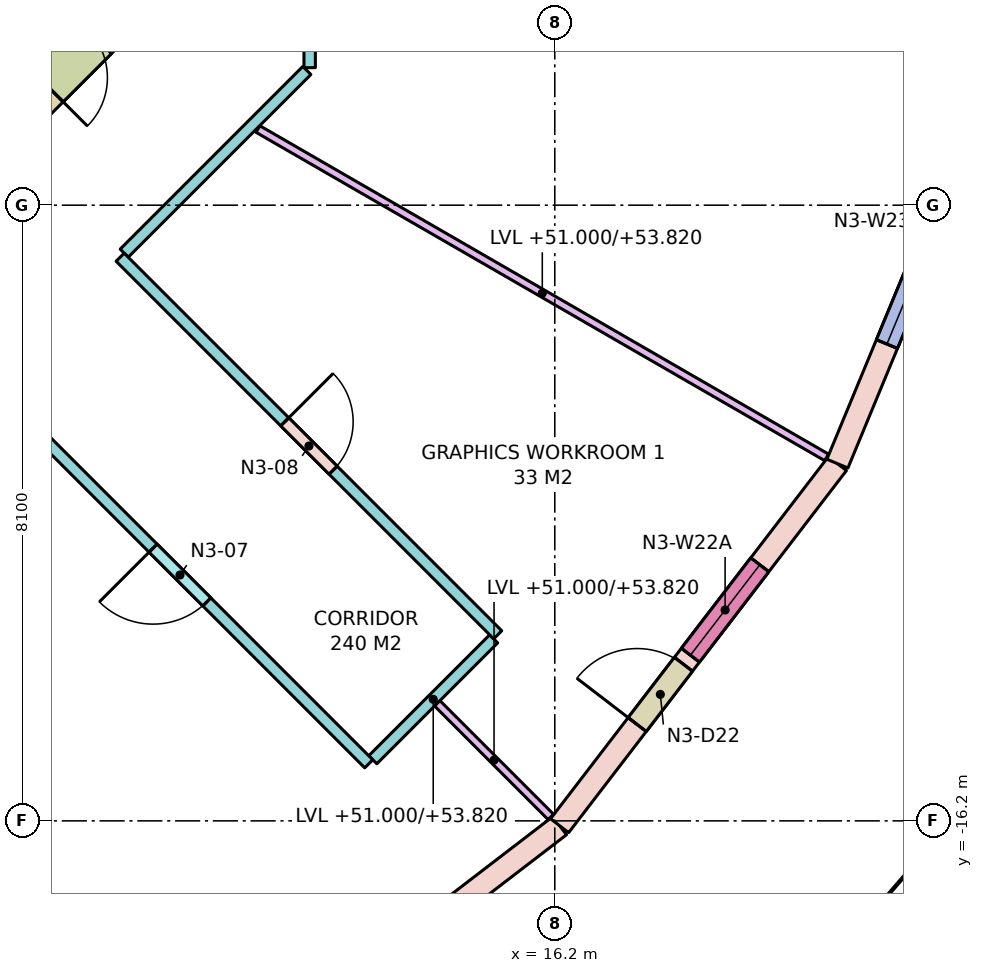
"""IFC4 building model, lengths in metres.
Left out: names, types, materials, properties, quantities, classifications, styles, units other than length and angle.
Written with IfcOpenShell. Run it as: python <this file> out.ifc"""

import sys

from ifc_helpers import new_model, si_unit, direction, frame, frame_2d, origin, place, context, subcontext, project, spatial, rectangle, extrude, element, fill, save


model = new_model("IFC4")
c1 = context("Model", 3, precision=1e-05, world=origin(), true_north=direction((0.0, 1.0)))
c2 = subcontext(c1, "Body", "Model", "MODEL_VIEW")
j1 = project(units=[si_unit("LENGTHUNIT", "METRE"), si_unit("PLANEANGLEUNIT", "RADIAN")], contexts=[c1])
p1 = place(None, origin())
s1 = spatial("IfcSite", under=j1, at=p1, CompositionType="ELEMENT")
p2 = place(p1, origin())
s2 = spatial("IfcBuilding", under=s1, at=p2, CompositionType="ELEMENT")
p3 = place(p2, frame((0.0, 0.0, 51.0)))
s3 = spatial("IfcBuildingStorey", under=s2, at=p3, CompositionType="ELEMENT", Elevation=51.0)
p4 = place(p3, frame((10.418, -5.418, -0.28), z_axis=(0.0, 0.0, 1.0), x_axis=(-0.707106781187, -0.707106781187, 0.0)))
e1 = element("IfcWall", 1, at=p4, inside=s3, PredefinedType="SHEAR", context=c2, shape_type="SweptSolid", body=[
    extrude(rectangle(XDim=4.243, YDim=0.9, at=frame_2d((2.121, 0.0))), origin(), (0.0, 0.0, 1.0), 4.0),
])
p5 = place(p4, frame((0.52, 0.0, 0.28)))
e2 = element("IfcOpeningElement", 2, at=p5, cuts=e1, PredefinedType="OPENING", context=c2, shape_type="SweptSolid", body=[
    extrude(rectangle(XDim=0.9, YDim=2.1, at=frame_2d((0.45, 1.05))), frame((0.0, 0.46, 0.0), z_axis=(0.0, -1.0, 0.0), x_axis=(1.0, 0.0, 0.0)), (0.0, 0.0, 1.0), 0.92),
])
p6 = place(p3, frame((11.5, -19.919, 0.0), z_axis=(0.0, 0.0, 1.0), x_axis=(0.793339924758, 0.608778912074, 0.0)))
e3 = element("IfcWall", 3, at=p6, inside=s3, PredefinedType="STANDARD", context=c2, shape_type="SweptSolid", body=[
    extrude(rectangle(XDim=6.004, YDim=0.3, at=frame_2d((3.002, 0.0))), origin(), (0.0, 0.0, 1.0), 3.72),
])
p7 = place(p6, frame((1.702, 0.0, 0.8)))
e4 = element("IfcOpeningElement", 4, at=p7, cuts=e3, PredefinedType="OPENING", context=c2, shape_type="SweptSolid", body=[
    extrude(rectangle(XDim=2.6, YDim=2.7, at=frame_2d((1.3, 1.35))), frame((0.0, 0.16, 0.0), z_axis=(0.0, -1.0, 0.0), x_axis=(1.0, 0.0, 0.0)), (0.0, 0.0, 1.0), 0.32),
])
p8 = place(p3, frame((16.263, -16.263, 0.0), z_axis=(0.0, 0.0, 1.0), x_axis=(0.608778912074, 0.793339924758, 0.0)))
e5 = element("IfcWall", 5, at=p8, inside=s3, PredefinedType="STANDARD", context=c2, shape_type="SweptSolid", body=[
    extrude(rectangle(XDim=6.004, YDim=0.3, at=frame_2d((3.002, 0.0))), origin(), (0.0, 0.0, 1.0), 3.72),
])
p9 = place(p8, frame((1.677, 0.0, 0.0)))
e6 = element("IfcOpeningElement", 6, at=p9, cuts=e5, PredefinedType="OPENING", context=c2, shape_type="SweptSolid", body=[
    extrude(rectangle(XDim=1.0, YDim=2.4, at=frame_2d((0.5, 1.2))), frame((0.0, 0.16, 0.0), z_axis=(0.0, -1.0, 0.0), x_axis=(1.0, 0.0, 0.0)), (0.0, 0.0, 1.0), 0.32),
])
p10 = place(p8, frame((2.827, 0.0, 0.8)))
e7 = element("IfcOpeningElement", 7, at=p10, cuts=e5, PredefinedType="OPENING", context=c2, shape_type="SweptSolid", body=[
    extrude(rectangle(XDim=1.5, YDim=2.7, at=frame_2d((0.75, 1.35))), frame((0.0, 0.16, 0.0), z_axis=(0.0, -1.0, 0.0), x_axis=(1.0, 0.0, 0.0)), (0.0, 0.0, 1.0), 0.32),
])
p11 = place(p3, frame((19.919, -11.5, 0.0), z_axis=(0.0, 0.0, 1.0), x_axis=(0.382671411433, 0.923884511653, 0.0)))
e8 = element("IfcWall", 8, at=p11, inside=s3, PredefinedType="STANDARD", context=c2, shape_type="SweptSolid", body=[
    extrude(rectangle(XDim=6.004, YDim=0.3, at=frame_2d((3.002, 0.0))), origin(), (0.0, 0.0, 1.0), 3.72),
])
p12 = place(p11, frame((1.702, 0.0, 0.8)))
e9 = element("IfcOpeningElement", 9, at=p12, cuts=e8, PredefinedType="OPENING", context=c2, shape_type="SweptSolid", body=[
    extrude(rectangle(XDim=2.6, YDim=2.7, at=frame_2d((1.3, 1.35))), frame((0.0, 0.16, 0.0), z_axis=(0.0, -1.0, 0.0), x_axis=(1.0, 0.0, 0.0)), (0.0, 0.0, 1.0), 0.32),
])
p13 = place(p3, frame((15.396, -13.805, 0.0), z_axis=(0.0, 0.0, 1.0), x_axis=(-0.707106781187, -0.707106781187, 0.0)))
e10 = element("IfcWall", 10, at=p13, inside=s3, PredefinedType="PARTITIONING", context=c2, shape_type="SweptSolid", body=[
    extrude(rectangle(XDim=2.25, YDim=0.15, at=frame_2d((1.125, 0.0))), origin(), (0.0, 0.0, 1.0), 2.82),
])
p14 = place(p3, frame((13.752, -15.449, 0.0), z_axis=(0.0, 0.0, 1.0), x_axis=(-0.707089406061, 0.707124155885, 0.0)))
e11 = element("IfcWall", 11, at=p14, inside=s3, PredefinedType="PARTITIONING", context=c2, shape_type="SweptSolid", body=[
    extrude(rectangle(XDim=7.026, YDim=0.15, at=frame_2d((3.513, 0.0))), origin(), (0.0, 0.0, 1.0), 3.72),
])
p15 = place(p14, frame((3.013, 0.0, 0.0)))
e12 = element("IfcOpeningElement", 12, at=p15, cuts=e11, PredefinedType="OPENING", context=c2, shape_type="SweptSolid", body=[
    extrude(rectangle(XDim=1.0, YDim=2.1, at=frame_2d((0.5, 1.05))), frame((0.0, 0.085, 0.0), z_axis=(0.0, -1.0, 0.0), x_axis=(1.0, 0.0, 0.0)), (0.0, 0.0, 1.0), 0.17),
])
p16 = place(p3, frame((12.975, 6.291, 0.0), z_axis=(0.0, 0.0, 1.0), x_axis=(0.0, -1.0, 0.0)))
e13 = element("IfcWall", 13, at=p16, inside=s3, PredefinedType="PARTITIONING", context=c2, shape_type="SweptSolid", body=[
    extrude(rectangle(XDim=12.582, YDim=0.15, at=frame_2d((6.291, 0.0))), origin(), (0.0, 0.0, 1.0), 2.82),
])
p17 = place(p16, frame((5.391, 0.0, 0.0)))
e14 = element("IfcOpeningElement", 14, at=p17, cuts=e13, PredefinedType="OPENING", context=c2, shape_type="SweptSolid", body=[
    extrude(rectangle(XDim=1.8, YDim=2.1, at=frame_2d((0.9, 1.05))), frame((0.0, 0.085, 0.0), z_axis=(0.0, -1.0, 0.0), x_axis=(1.0, 0.0, 0.0)), (0.0, 0.0, 1.0), 0.17),
])
p18 = place(p3, frame((12.938, -6.328, 0.0), z_axis=(0.0, 0.0, 1.0), x_axis=(-0.707106781187, -0.707106781187, 0.0)))
e15 = element("IfcWall", 15, at=p18, inside=s3, PredefinedType="PARTITIONING", context=c2, shape_type="SweptSolid", body=[
    extrude(rectangle(XDim=3.399, YDim=0.15, at=frame_2d((1.7, 0.0))), origin(), (0.0, 0.0, 1.0), 2.82),
])
p19 = place(p3, frame((10.481, -8.784, 0.0), z_axis=(0.0, 0.0, 1.0), x_axis=(0.707124155885, -0.707089406061, 0.0)))
e16 = element("IfcWall", 16, at=p19, inside=s3, PredefinedType="PARTITIONING", context=c2, shape_type="SweptSolid", body=[
    extrude(rectangle(XDim=7.026, YDim=0.15, at=frame_2d((3.513, 0.0))), origin(), (0.0, 0.0, 1.0), 3.72),
])
p20 = place(p19, frame((3.063, 0.0, 0.0)))
e17 = element("IfcOpeningElement", 17, at=p20, cuts=e16, PredefinedType="OPENING", context=c2, shape_type="SweptSolid", body=[
    extrude(rectangle(XDim=0.9, YDim=2.1, at=frame_2d((0.45, 1.05))), frame((0.0, 0.085, 0.0), z_axis=(0.0, -1.0, 0.0), x_axis=(1.0, 0.0, 0.0)), (0.0, 0.0, 1.0), 0.17),
])
p21 = place(p3, frame((14.654, -14.654, 0.0), z_axis=(0.0, 0.0, 1.0), x_axis=(0.707106781187, -0.707106781187, 0.0)))
e18 = element("IfcWall", 18, at=p21, inside=s3, PredefinedType="PARTITIONING", context=c2, shape_type="SweptSolid", body=[
    extrude(rectangle(XDim=2.113, YDim=0.1, at=frame_2d((1.057, 0.0))), origin(), (0.0, 0.0, 1.0), 2.82),
])
p22 = place(p3, frame((12.294, -7.098, 0.0), z_axis=(0.0, 0.0, 1.0), x_axis=(0.866010547425, -0.500025731086, 0.0)))
e19 = element("IfcWall", 19, at=p22, inside=s3, PredefinedType="PARTITIONING", context=c2, shape_type="SweptSolid", body=[
    extrude(rectangle(XDim=8.641, YDim=0.1, at=frame_2d((4.32, 0.0))), origin(), (0.0, 0.0, 1.0), 2.82),
])
p23 = place(p9, origin())
e20 = element("IfcDoor", 20, at=p23, inside=s3, OperationType="SINGLE_SWING_LEFT", PredefinedType="DOOR", context=c2, shape_type="SweptSolid", body=[
    extrude(rectangle(XDim=1.0, YDim=2.4, at=frame_2d((0.5, 1.2))), frame((0.0, 0.025, 0.0), z_axis=(0.0, -1.0, 0.0), x_axis=(1.0, 0.0, 0.0)), (0.0, 0.0, 1.0), 0.05),
])
fill(e6, e20)
p24 = place(p10, origin())
e21 = element("IfcWindow", 21, at=p24, inside=s3, PartitioningType="SINGLE_PANEL", PredefinedType="WINDOW", context=c2, shape_type="SweptSolid", body=[
    extrude(rectangle(XDim=1.5, YDim=2.7, at=frame_2d((0.75, 1.35))), frame((0.0, 0.03, 0.0), z_axis=(0.0, -1.0, 0.0), x_axis=(1.0, 0.0, 0.0)), (0.0, 0.0, 1.0), 0.06),
])
fill(e7, e21)
p25 = place(p12, origin())
e22 = element("IfcWindow", 22, at=p25, inside=s3, PartitioningType="SINGLE_PANEL", PredefinedType="WINDOW", context=c2, shape_type="SweptSolid", body=[
    extrude(rectangle(XDim=2.6, YDim=2.7, at=frame_2d((1.3, 1.35))), frame((0.0, 0.03, 0.0), z_axis=(0.0, -1.0, 0.0), x_axis=(1.0, 0.0, 0.0)), (0.0, 0.0, 1.0), 0.06),
])
fill(e9, e22)
p26 = place(p5, origin())
e23 = element("IfcDoor", 23, at=p26, inside=s3, OperationType="SINGLE_SWING_RIGHT", PredefinedType="DOOR", context=c2, shape_type="SweptSolid", body=[
    extrude(rectangle(XDim=0.9, YDim=2.1, at=frame_2d((0.45, 1.05))), frame((0.0, 0.025, 0.0), z_axis=(0.0, -1.0, 0.0), x_axis=(1.0, 0.0, 0.0)), (0.0, 0.0, 1.0), 0.05),
])
fill(e2, e23)
p27 = place(p15, origin())
e24 = element("IfcDoor", 24, at=p27, inside=s3, OperationType="SINGLE_SWING_RIGHT", PredefinedType="DOOR", context=c2, shape_type="SweptSolid", body=[
    extrude(rectangle(XDim=1.0, YDim=2.1, at=frame_2d((0.5, 1.05))), frame((0.0, 0.025, 0.0), z_axis=(0.0, -1.0, 0.0), x_axis=(1.0, 0.0, 0.0)), (0.0, 0.0, 1.0), 0.05),
])
fill(e12, e24)
p28 = place(p20, origin())
e25 = element("IfcDoor", 25, at=p28, inside=s3, OperationType="SINGLE_SWING_LEFT", PredefinedType="DOOR", context=c2, shape_type="SweptSolid", body=[
    extrude(rectangle(XDim=0.9, YDim=2.1, at=frame_2d((0.45, 1.05))), frame((0.0, 0.025, 0.0), z_axis=(0.0, -1.0, 0.0), x_axis=(1.0, 0.0, 0.0)), (0.0, 0.0, 1.0), 0.05),
])
fill(e17, e25)
save(model, sys.argv[1])
